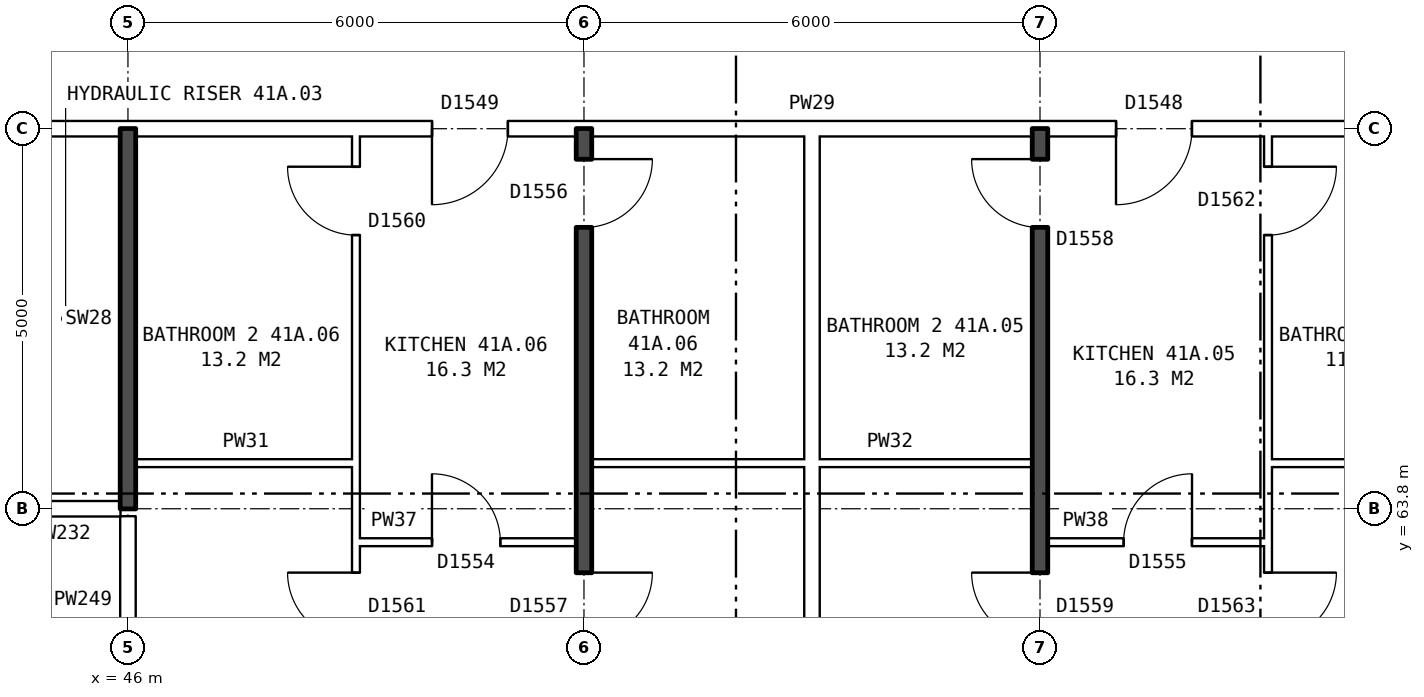
"""IFC4 building model, lengths in metres.
Left out: names, types, materials, properties, quantities, classifications, styles, units other than length and angle.
Written with IfcOpenShell. Run it as: python <this file> out.ifc"""

import sys

from ifc_helpers import new_model, si_unit, direction, frame, frame_2d, origin, place, context, subcontext, project, spatial, rectangle, extrude, element, fill, save


model = new_model("IFC4")
c1 = context("Model", 3, precision=1e-05, world=origin(), true_north=direction((0.0, 1.0)))
c2 = subcontext(c1, "Body", "Model", "MODEL_VIEW")
j1 = project(units=[si_unit("LENGTHUNIT", "METRE"), si_unit("PLANEANGLEUNIT", "RADIAN")], contexts=[c1])
p1 = place(None, origin())
s1 = spatial("IfcSite", under=j1, at=p1, CompositionType="ELEMENT")
p2 = place(p1, origin())
s2 = spatial("IfcBuilding", under=s1, at=p2, CompositionType="ELEMENT")
p3 = place(p2, frame((0.0, 0.0, 148.5)))
s3 = spatial("IfcBuildingStorey", under=s2, at=p3, CompositionType="ELEMENT", Elevation=148.5)
p4 = place(p3, frame((49.0, 63.36, 0.0), z_axis=(0.0, 0.0, 1.0), x_axis=(1.0, 0.0, 0.0)))
e1 = element("IfcWall", 1, at=p4, inside=s3, PredefinedType="PARTITIONING", context=c2, shape_type="SweptSolid", body=[
    extrude(rectangle(XDim=2.9, YDim=0.1, at=frame_2d((1.45, 0.0))), origin(), (0.0, 0.0, 1.0), 2.85),
])
p5 = place(p4, frame((1.0, 0.0, 0.0)))
e2 = element("IfcOpeningElement", 2, at=p5, cuts=e1, PredefinedType="OPENING", context=c2, shape_type="SweptSolid", body=[
    extrude(rectangle(XDim=0.9, YDim=2.1, at=frame_2d((0.45, 1.05))), frame((0.0, 0.06, 0.0), z_axis=(0.0, -1.0, 0.0), x_axis=(1.0, 0.0, 0.0)), (0.0, 0.0, 1.0), 0.12),
])
p6 = place(p3, frame((58.1, 63.36, 0.0), z_axis=(0.0, 0.0, 1.0), x_axis=(1.0, 0.0, 0.0)))
e3 = element("IfcWall", 3, at=p6, inside=s3, PredefinedType="PARTITIONING", context=c2, shape_type="SweptSolid", body=[
    extrude(rectangle(XDim=2.9, YDim=0.1, at=frame_2d((1.45, 0.0))), origin(), (0.0, 0.0, 1.0), 2.85),
])
p7 = place(p6, frame((1.0, 0.0, 0.0)))
e4 = element("IfcOpeningElement", 4, at=p7, cuts=e3, PredefinedType="OPENING", context=c2, shape_type="SweptSolid", body=[
    extrude(rectangle(XDim=0.9, YDim=2.1, at=frame_2d((0.45, 1.05))), frame((0.0, 0.06, 0.0), z_axis=(0.0, -1.0, 0.0), x_axis=(1.0, 0.0, 0.0)), (0.0, 0.0, 1.0), 0.12),
])
p8 = place(p3, frame((44.36, 63.8, 0.0), z_axis=(0.0, 0.0, 1.0), x_axis=(1.0, 0.0, 0.0)))
e5 = element("IfcWall", 5, at=p8, inside=s3, PredefinedType="PARTITIONING", context=c2, shape_type="SweptSolid", body=[
    extrude(rectangle(XDim=1.54, YDim=0.2, at=frame_2d((0.77, 0.0))), origin(), (0.0, 0.0, 1.0), 2.85),
])
p9 = place(p3, frame((46.1, 64.4, 0.0), z_axis=(0.0, 0.0, 1.0), x_axis=(1.0, 0.0, 0.0)))
e6 = element("IfcWall", 6, at=p9, inside=s3, PredefinedType="PARTITIONING", context=c2, shape_type="SweptSolid", body=[
    extrude(rectangle(XDim=2.9, YDim=0.1, at=frame_2d((1.45, 0.0))), origin(), (0.0, 0.0, 1.0), 2.85),
])
p10 = place(p3, frame((52.1, 64.4, 0.0), z_axis=(0.0, 0.0, 1.0), x_axis=(1.0, 0.0, 0.0)))
e7 = element("IfcWall", 7, at=p10, inside=s3, PredefinedType="PARTITIONING", context=c2, shape_type="SweptSolid", body=[
    extrude(rectangle(XDim=5.8, YDim=0.1, at=frame_2d((2.9, 0.0))), origin(), (0.0, 0.0, 1.0), 2.85),
])
p11 = place(p3, frame((61.0, 64.4, 0.0), z_axis=(0.0, 0.0, 1.0), x_axis=(1.0, 0.0, 0.0)))
e8 = element("IfcWall", 8, at=p11, inside=s3, PredefinedType="PARTITIONING", context=c2, shape_type="SweptSolid", body=[
    extrude(rectangle(XDim=2.64, YDim=0.1, at=frame_2d((1.32, 0.0))), origin(), (0.0, 0.0, 1.0), 2.85),
])
p12 = place(p3, frame((44.36, 68.8, 0.0), z_axis=(0.0, 0.0, 1.0), x_axis=(1.0, 0.0, 0.0)))
e9 = element("IfcWall", 9, at=p12, inside=s3, PredefinedType="PARTITIONING", context=c2, shape_type="SweptSolid", body=[
    extrude(rectangle(XDim=19.28, YDim=0.2, at=frame_2d((9.64, 0.0))), origin(), (0.0, 0.0, 1.0), 2.85),
])
p13 = place(p12, frame((14.64, 0.0, 0.0)))
e10 = element("IfcOpeningElement", 10, at=p13, cuts=e9, PredefinedType="OPENING", context=c2, shape_type="SweptSolid", body=[
    extrude(rectangle(XDim=1.0, YDim=2.1, at=frame_2d((0.5, 1.05))), frame((0.0, 0.11, 0.0), z_axis=(0.0, -1.0, 0.0), x_axis=(1.0, 0.0, 0.0)), (0.0, 0.0, 1.0), 0.22),
])
p14 = place(p12, frame((5.64, 0.0, 0.0)))
e11 = element("IfcOpeningElement", 11, at=p14, cuts=e9, PredefinedType="OPENING", context=c2, shape_type="SweptSolid", body=[
    extrude(rectangle(XDim=1.0, YDim=2.1, at=frame_2d((0.5, 1.05))), frame((0.0, 0.11, 0.0), z_axis=(0.0, -1.0, 0.0), x_axis=(1.0, 0.0, 0.0)), (0.0, 0.0, 1.0), 0.22),
])
p15 = place(p3, frame((46.0, 61.5, 0.0), z_axis=(0.0, 0.0, 1.0), x_axis=(0.0, 1.0, 0.0)))
e12 = element("IfcWall", 12, at=p15, inside=s3, PredefinedType="PARTITIONING", context=c2, shape_type="SweptSolid", body=[
    extrude(rectangle(XDim=2.2, YDim=0.2, at=frame_2d((1.1, 0.0))), origin(), (0.0, 0.0, 1.0), 2.85),
])
p16 = place(p3, frame((46.0, 63.8, 0.0), z_axis=(0.0, 0.0, 1.0), x_axis=(0.0, 1.0, 0.0)))
e13 = element("IfcWall", 13, at=p16, inside=s3, PredefinedType="SOLIDWALL", context=c2, shape_type="SweptSolid", body=[
    extrude(rectangle(XDim=5.0, YDim=0.2, at=frame_2d((2.5, 0.0))), origin(), (0.0, 0.0, 1.0), 2.85),
])
p17 = place(p3, frame((49.0, 54.36, 0.0), z_axis=(0.0, 0.0, 1.0), x_axis=(0.0, 1.0, 0.0)))
e14 = element("IfcWall", 14, at=p17, inside=s3, PredefinedType="PARTITIONING", context=c2, shape_type="SweptSolid", body=[
    extrude(rectangle(XDim=14.34, YDim=0.1, at=frame_2d((7.17, 0.0))), origin(), (0.0, 0.0, 1.0), 2.85),
])
p18 = place(p17, frame((7.7, 0.0, 0.0)))
e15 = element("IfcOpeningElement", 15, at=p18, cuts=e14, PredefinedType="OPENING", context=c2, shape_type="SweptSolid", body=[
    extrude(rectangle(XDim=0.9, YDim=2.1, at=frame_2d((0.45, 1.05))), frame((0.0, 0.06, 0.0), z_axis=(0.0, -1.0, 0.0), x_axis=(1.0, 0.0, 0.0)), (0.0, 0.0, 1.0), 0.12),
])
p19 = place(p17, frame((13.04, 0.0, 0.0)))
e16 = element("IfcOpeningElement", 16, at=p19, cuts=e14, PredefinedType="OPENING", context=c2, shape_type="SweptSolid", body=[
    extrude(rectangle(XDim=0.9, YDim=2.1, at=frame_2d((0.45, 1.05))), frame((0.0, 0.06, 0.0), z_axis=(0.0, -1.0, 0.0), x_axis=(1.0, 0.0, 0.0)), (0.0, 0.0, 1.0), 0.12),
])
p20 = place(p3, frame((52.0, 54.36, 0.0), z_axis=(0.0, 0.0, 1.0), x_axis=(0.0, 1.0, 0.0)))
e17 = element("IfcWall", 17, at=p20, inside=s3, PredefinedType="SOLIDWALL", context=c2, shape_type="SweptSolid", body=[
    extrude(rectangle(XDim=14.44, YDim=0.2, at=frame_2d((7.22, 0.0))), origin(), (0.0, 0.0, 1.0), 2.85),
])
p21 = place(p20, frame((7.7, 0.0, 0.0)))
e18 = element("IfcOpeningElement", 18, at=p21, cuts=e17, PredefinedType="OPENING", context=c2, shape_type="SweptSolid", body=[
    extrude(rectangle(XDim=0.9, YDim=2.1, at=frame_2d((0.45, 1.05))), frame((0.0, 0.11, 0.0), z_axis=(0.0, -1.0, 0.0), x_axis=(1.0, 0.0, 0.0)), (0.0, 0.0, 1.0), 0.22),
])
p22 = place(p20, frame((13.14, 0.0, 0.0)))
e19 = element("IfcOpeningElement", 19, at=p22, cuts=e17, PredefinedType="OPENING", context=c2, shape_type="SweptSolid", body=[
    extrude(rectangle(XDim=0.9, YDim=2.1, at=frame_2d((0.45, 1.05))), frame((0.0, 0.11, 0.0), z_axis=(0.0, -1.0, 0.0), x_axis=(1.0, 0.0, 0.0)), (0.0, 0.0, 1.0), 0.22),
])
p23 = place(p3, frame((55.0, 54.36, 0.0), z_axis=(0.0, 0.0, 1.0), x_axis=(0.0, 1.0, 0.0)))
e20 = element("IfcWall", 20, at=p23, inside=s3, PredefinedType="PARTITIONING", context=c2, shape_type="SweptSolid", body=[
    extrude(rectangle(XDim=14.34, YDim=0.2, at=frame_2d((7.17, 0.0))), origin(), (0.0, 0.0, 1.0), 2.85),
])
p24 = place(p3, frame((58.0, 54.36, 0.0), z_axis=(0.0, 0.0, 1.0), x_axis=(0.0, 1.0, 0.0)))
e21 = element("IfcWall", 21, at=p24, inside=s3, PredefinedType="SOLIDWALL", context=c2, shape_type="SweptSolid", body=[
    extrude(rectangle(XDim=14.44, YDim=0.2, at=frame_2d((7.22, 0.0))), origin(), (0.0, 0.0, 1.0), 2.85),
])
p25 = place(p24, frame((7.7, 0.0, 0.0)))
e22 = element("IfcOpeningElement", 22, at=p25, cuts=e21, PredefinedType="OPENING", context=c2, shape_type="SweptSolid", body=[
    extrude(rectangle(XDim=0.9, YDim=2.1, at=frame_2d((0.45, 1.05))), frame((0.0, 0.11, 0.0), z_axis=(0.0, -1.0, 0.0), x_axis=(1.0, 0.0, 0.0)), (0.0, 0.0, 1.0), 0.22),
])
p26 = place(p24, frame((13.14, 0.0, 0.0)))
e23 = element("IfcOpeningElement", 23, at=p26, cuts=e21, PredefinedType="OPENING", context=c2, shape_type="SweptSolid", body=[
    extrude(rectangle(XDim=0.9, YDim=2.1, at=frame_2d((0.45, 1.05))), frame((0.0, 0.11, 0.0), z_axis=(0.0, -1.0, 0.0), x_axis=(1.0, 0.0, 0.0)), (0.0, 0.0, 1.0), 0.22),
])
p27 = place(p3, frame((61.0, 54.36, 0.0), z_axis=(0.0, 0.0, 1.0), x_axis=(0.0, 1.0, 0.0)))
e24 = element("IfcWall", 24, at=p27, inside=s3, PredefinedType="PARTITIONING", context=c2, shape_type="SweptSolid", body=[
    extrude(rectangle(XDim=14.34, YDim=0.1, at=frame_2d((7.17, 0.0))), origin(), (0.0, 0.0, 1.0), 2.85),
])
p28 = place(p27, frame((7.7, 0.0, 0.0)))
e25 = element("IfcOpeningElement", 25, at=p28, cuts=e24, PredefinedType="OPENING", context=c2, shape_type="SweptSolid", body=[
    extrude(rectangle(XDim=0.9, YDim=2.1, at=frame_2d((0.45, 1.05))), frame((0.0, 0.06, 0.0), z_axis=(0.0, -1.0, 0.0), x_axis=(1.0, 0.0, 0.0)), (0.0, 0.0, 1.0), 0.12),
])
p29 = place(p27, frame((13.04, 0.0, 0.0)))
e26 = element("IfcOpeningElement", 26, at=p29, cuts=e24, PredefinedType="OPENING", context=c2, shape_type="SweptSolid", body=[
    extrude(rectangle(XDim=0.9, YDim=2.1, at=frame_2d((0.45, 1.05))), frame((0.0, 0.06, 0.0), z_axis=(0.0, -1.0, 0.0), x_axis=(1.0, 0.0, 0.0)), (0.0, 0.0, 1.0), 0.12),
])
p30 = place(p28, frame((0.9, 0.0, 0.0), z_axis=(0.0, 0.0, 1.0), x_axis=(-1.0, 0.0, 0.0)))
e27 = element("IfcDoor", 27, at=p30, inside=s3, OperationType="SINGLE_SWING_LEFT", PredefinedType="DOOR", context=c2, shape_type="SweptSolid", body=[
    extrude(rectangle(XDim=0.9, YDim=2.1, at=frame_2d((0.45, 1.05))), frame((0.0, 0.025, 0.0), z_axis=(0.0, -1.0, 0.0), x_axis=(1.0, 0.0, 0.0)), (0.0, 0.0, 1.0), 0.05),
])
fill(e25, e27)
p31 = place(p25, origin())
e28 = element("IfcDoor", 28, at=p31, inside=s3, OperationType="SINGLE_SWING_RIGHT", PredefinedType="DOOR", context=c2, shape_type="SweptSolid", body=[
    extrude(rectangle(XDim=0.9, YDim=2.1, at=frame_2d((0.45, 1.05))), frame((0.0, 0.025, 0.0), z_axis=(0.0, -1.0, 0.0), x_axis=(1.0, 0.0, 0.0)), (0.0, 0.0, 1.0), 0.05),
])
fill(e22, e28)
p32 = place(p13, frame((1.0, 0.0, 0.0), z_axis=(0.0, 0.0, 1.0), x_axis=(-1.0, 0.0, 0.0)))
e29 = element("IfcDoor", 29, at=p32, inside=s3, OperationType="SINGLE_SWING_RIGHT", PredefinedType="DOOR", context=c2, shape_type="SweptSolid", body=[
    extrude(rectangle(XDim=1.0, YDim=2.1, at=frame_2d((0.5, 1.05))), frame((0.0, 0.025, 0.0), z_axis=(0.0, -1.0, 0.0), x_axis=(1.0, 0.0, 0.0)), (0.0, 0.0, 1.0), 0.05),
])
fill(e10, e29)
p33 = place(p7, origin())
e30 = element("IfcDoor", 30, at=p33, inside=s3, OperationType="SINGLE_SWING_RIGHT", PredefinedType="DOOR", context=c2, shape_type="SweptSolid", body=[
    extrude(rectangle(XDim=0.9, YDim=2.1, at=frame_2d((0.45, 1.05))), frame((0.0, 0.025, 0.0), z_axis=(0.0, -1.0, 0.0), x_axis=(1.0, 0.0, 0.0)), (0.0, 0.0, 1.0), 0.05),
])
fill(e4, e30)
p34 = place(p29, frame((0.9, 0.0, 0.0), z_axis=(0.0, 0.0, 1.0), x_axis=(-1.0, 0.0, 0.0)))
e31 = element("IfcDoor", 31, at=p34, inside=s3, OperationType="SINGLE_SWING_LEFT", PredefinedType="DOOR", context=c2, shape_type="SweptSolid", body=[
    extrude(rectangle(XDim=0.9, YDim=2.1, at=frame_2d((0.45, 1.05))), frame((0.0, 0.025, 0.0), z_axis=(0.0, -1.0, 0.0), x_axis=(1.0, 0.0, 0.0)), (0.0, 0.0, 1.0), 0.05),
])
fill(e26, e31)
p35 = place(p26, origin())
e32 = element("IfcDoor", 32, at=p35, inside=s3, OperationType="SINGLE_SWING_RIGHT", PredefinedType="DOOR", context=c2, shape_type="SweptSolid", body=[
    extrude(rectangle(XDim=0.9, YDim=2.1, at=frame_2d((0.45, 1.05))), frame((0.0, 0.025, 0.0), z_axis=(0.0, -1.0, 0.0), x_axis=(1.0, 0.0, 0.0)), (0.0, 0.0, 1.0), 0.05),
])
fill(e23, e32)
p36 = place(p21, frame((0.9, 0.0, 0.0), z_axis=(0.0, 0.0, 1.0), x_axis=(-1.0, 0.0, 0.0)))
e33 = element("IfcDoor", 33, at=p36, inside=s3, OperationType="SINGLE_SWING_LEFT", PredefinedType="DOOR", context=c2, shape_type="SweptSolid", body=[
    extrude(rectangle(XDim=0.9, YDim=2.1, at=frame_2d((0.45, 1.05))), frame((0.0, 0.025, 0.0), z_axis=(0.0, -1.0, 0.0), x_axis=(1.0, 0.0, 0.0)), (0.0, 0.0, 1.0), 0.05),
])
fill(e18, e33)
p37 = place(p18, origin())
e34 = element("IfcDoor", 34, at=p37, inside=s3, OperationType="SINGLE_SWING_RIGHT", PredefinedType="DOOR", context=c2, shape_type="SweptSolid", body=[
    extrude(rectangle(XDim=0.9, YDim=2.1, at=frame_2d((0.45, 1.05))), frame((0.0, 0.025, 0.0), z_axis=(0.0, -1.0, 0.0), x_axis=(1.0, 0.0, 0.0)), (0.0, 0.0, 1.0), 0.05),
])
fill(e15, e34)
p38 = place(p14, frame((1.0, 0.0, 0.0), z_axis=(0.0, 0.0, 1.0), x_axis=(-1.0, 0.0, 0.0)))
e35 = element("IfcDoor", 35, at=p38, inside=s3, OperationType="SINGLE_SWING_RIGHT", PredefinedType="DOOR", context=c2, shape_type="SweptSolid", body=[
    extrude(rectangle(XDim=1.0, YDim=2.1, at=frame_2d((0.5, 1.05))), frame((0.0, 0.025, 0.0), z_axis=(0.0, -1.0, 0.0), x_axis=(1.0, 0.0, 0.0)), (0.0, 0.0, 1.0), 0.05),
])
fill(e11, e35)
p39 = place(p5, origin())
e36 = element("IfcDoor", 36, at=p39, inside=s3, OperationType="SINGLE_SWING_LEFT", PredefinedType="DOOR", context=c2, shape_type="SweptSolid", body=[
    extrude(rectangle(XDim=0.9, YDim=2.1, at=frame_2d((0.45, 1.05))), frame((0.0, 0.025, 0.0), z_axis=(0.0, -1.0, 0.0), x_axis=(1.0, 0.0, 0.0)), (0.0, 0.0, 1.0), 0.05),
])
fill(e2, e36)
p40 = place(p22, frame((0.9, 0.0, 0.0), z_axis=(0.0, 0.0, 1.0), x_axis=(-1.0, 0.0, 0.0)))
e37 = element("IfcDoor", 37, at=p40, inside=s3, OperationType="SINGLE_SWING_LEFT", PredefinedType="DOOR", context=c2, shape_type="SweptSolid", body=[
    extrude(rectangle(XDim=0.9, YDim=2.1, at=frame_2d((0.45, 1.05))), frame((0.0, 0.025, 0.0), z_axis=(0.0, -1.0, 0.0), x_axis=(1.0, 0.0, 0.0)), (0.0, 0.0, 1.0), 0.05),
])
fill(e19, e37)
p41 = place(p19, origin())
e38 = element("IfcDoor", 38, at=p41, inside=s3, OperationType="SINGLE_SWING_RIGHT", PredefinedType="DOOR", context=c2, shape_type="SweptSolid", body=[
    extrude(rectangle(XDim=0.9, YDim=2.1, at=frame_2d((0.45, 1.05))), frame((0.0, 0.025, 0.0), z_axis=(0.0, -1.0, 0.0), x_axis=(1.0, 0.0, 0.0)), (0.0, 0.0, 1.0), 0.05),
])
fill(e16, e38)
save(model, sys.argv[1])
